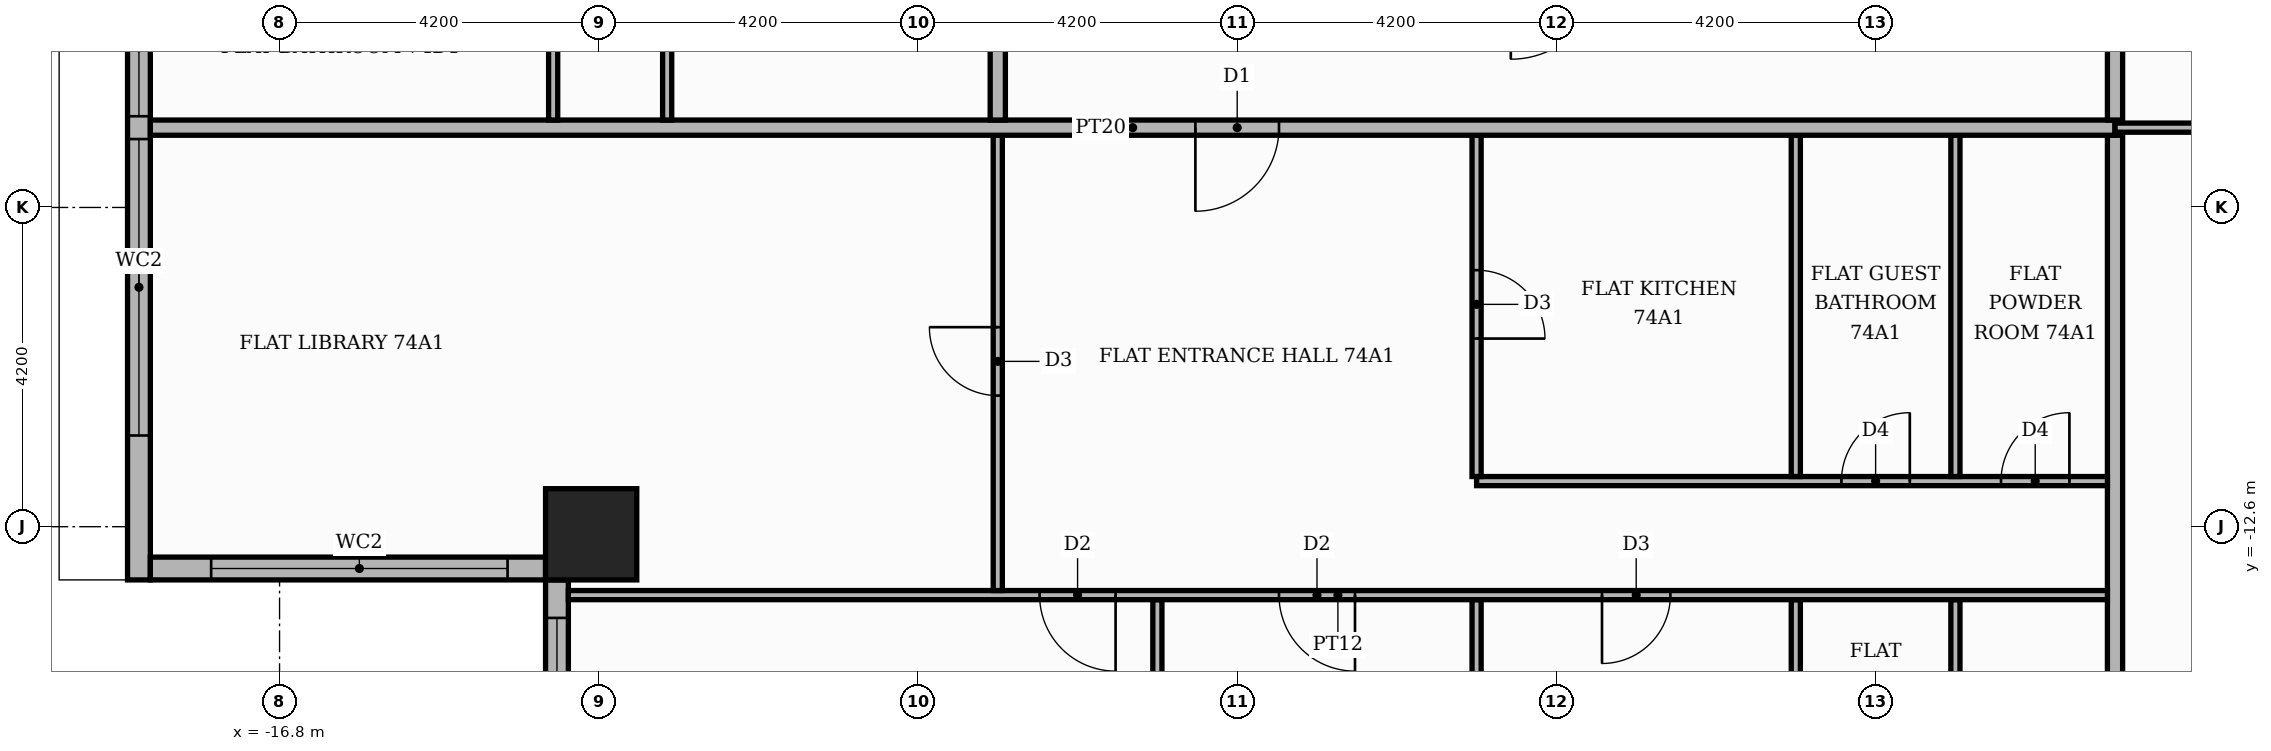
"""IFC4 building model, lengths in metres.
Left out: names, types, materials, properties, quantities, classifications, styles, units other than length and angle.
Written with IfcOpenShell. Run it as: python <this file> out.ifc"""

import sys

from ifc_helpers import new_model, si_unit, direction, frame, frame_2d, origin, origin_2d, place, context, subcontext, project, spatial, rectangle, extrude, element, fill, save


model = new_model("IFC4")
c1 = context("Model", 3, precision=1e-05, world=origin(), true_north=direction((0.0, 1.0)))
c2 = subcontext(c1, "Body", "Model", "MODEL_VIEW")
j1 = project(units=[si_unit("LENGTHUNIT", "METRE"), si_unit("PLANEANGLEUNIT", "RADIAN")], contexts=[c1])
p1 = place(None, origin())
s1 = spatial("IfcSite", under=j1, at=p1, CompositionType="ELEMENT")
p2 = place(p1, origin())
s2 = spatial("IfcBuilding", under=s1, at=p2, CompositionType="ELEMENT")
p3 = place(p2, frame((0.0, 0.0, 308.4)))
s3 = spatial("IfcBuildingStorey", under=s2, at=p3, CompositionType="ELEMENT", Elevation=308.4)
p4 = place(p3, frame((-12.7, -12.7, 0.0), z_axis=(0.0, 0.0, 1.0), x_axis=(1.0, 0.0, 0.0)))
e1 = element("IfcColumn", 1, at=p4, inside=s3, PredefinedType="COLUMN", context=c2, shape_type="SweptSolid", body=[
    extrude(rectangle(XDim=1.2, YDim=1.2, at=origin_2d()), origin(), (0.0, 0.0, 1.0), 3.9),
])
p5 = place(p3, frame((-18.65, 13.0, 0.0), z_axis=(0.0, 0.0, 1.0), x_axis=(0.0, -1.0, 0.0)))
e2 = element("IfcWall", 2, at=p5, inside=s3, PredefinedType="STANDARD", context=c2, shape_type="SweptSolid", body=[
    extrude(rectangle(XDim=26.3, YDim=0.3, at=frame_2d((13.15, 0.0))), origin(), (0.0, 0.0, 1.0), 3.55),
])
p6 = place(p5, frame((1.6, 0.0, 0.6)))
e3 = element("IfcOpeningElement", 3, at=p6, cuts=e2, PredefinedType="OPENING", context=c2, shape_type="SweptSolid", body=[
    extrude(rectangle(XDim=3.9, YDim=2.4, at=frame_2d((1.95, 1.2))), frame((0.0, 0.16, 0.0), z_axis=(0.0, -1.0, 0.0), x_axis=(1.0, 0.0, 0.0)), (0.0, 0.0, 1.0), 0.32),
])
p7 = place(p5, frame((5.8, 0.0, 0.6)))
e4 = element("IfcOpeningElement", 4, at=p7, cuts=e2, PredefinedType="OPENING", context=c2, shape_type="SweptSolid", body=[
    extrude(rectangle(XDim=3.9, YDim=2.4, at=frame_2d((1.95, 1.2))), frame((0.0, 0.16, 0.0), z_axis=(0.0, -1.0, 0.0), x_axis=(1.0, 0.0, 0.0)), (0.0, 0.0, 1.0), 0.32),
])
p8 = place(p5, frame((10.0, 0.0, 0.6)))
e5 = element("IfcOpeningElement", 5, at=p8, cuts=e2, PredefinedType="OPENING", context=c2, shape_type="SweptSolid", body=[
    extrude(rectangle(XDim=1.8, YDim=2.4, at=frame_2d((0.9, 1.2))), frame((0.0, 0.16, 0.0), z_axis=(0.0, -1.0, 0.0), x_axis=(1.0, 0.0, 0.0)), (0.0, 0.0, 1.0), 0.32),
])
p9 = place(p5, frame((12.1, 0.0, 0.6)))
e6 = element("IfcOpeningElement", 6, at=p9, cuts=e2, PredefinedType="OPENING", context=c2, shape_type="SweptSolid", body=[
    extrude(rectangle(XDim=1.8, YDim=2.4, at=frame_2d((0.9, 1.2))), frame((0.0, 0.16, 0.0), z_axis=(0.0, -1.0, 0.0), x_axis=(1.0, 0.0, 0.0)), (0.0, 0.0, 1.0), 0.32),
])
p10 = place(p5, frame((14.2, 0.0, 0.6)))
e7 = element("IfcOpeningElement", 7, at=p10, cuts=e2, PredefinedType="OPENING", context=c2, shape_type="SweptSolid", body=[
    extrude(rectangle(XDim=3.9, YDim=2.4, at=frame_2d((1.95, 1.2))), frame((0.0, 0.16, 0.0), z_axis=(0.0, -1.0, 0.0), x_axis=(1.0, 0.0, 0.0)), (0.0, 0.0, 1.0), 0.32),
])
p11 = place(p5, frame((18.4, 0.0, 0.6)))
e8 = element("IfcOpeningElement", 8, at=p11, cuts=e2, PredefinedType="OPENING", context=c2, shape_type="SweptSolid", body=[
    extrude(rectangle(XDim=1.8, YDim=2.4, at=frame_2d((0.9, 1.2))), frame((0.0, 0.16, 0.0), z_axis=(0.0, -1.0, 0.0), x_axis=(1.0, 0.0, 0.0)), (0.0, 0.0, 1.0), 0.32),
])
p12 = place(p5, frame((20.5, 0.0, 0.6)))
e9 = element("IfcOpeningElement", 9, at=p12, cuts=e2, PredefinedType="OPENING", context=c2, shape_type="SweptSolid", body=[
    extrude(rectangle(XDim=3.9, YDim=2.4, at=frame_2d((1.95, 1.2))), frame((0.0, 0.16, 0.0), z_axis=(0.0, -1.0, 0.0), x_axis=(1.0, 0.0, 0.0)), (0.0, 0.0, 1.0), 0.32),
])
p13 = place(p3, frame((-18.5, -13.15, 0.0), z_axis=(0.0, 0.0, 1.0), x_axis=(1.0, 0.0, 0.0)))
e10 = element("IfcWall", 10, at=p13, inside=s3, PredefinedType="STANDARD", context=c2, shape_type="SweptSolid", body=[
    extrude(rectangle(XDim=5.2, YDim=0.3, at=frame_2d((2.6, 0.0))), origin(), (0.0, 0.0, 1.0), 3.55),
])
p14 = place(p13, frame((0.8, 0.0, 0.6)))
e11 = element("IfcOpeningElement", 11, at=p14, cuts=e10, PredefinedType="OPENING", context=c2, shape_type="SweptSolid", body=[
    extrude(rectangle(XDim=3.9, YDim=2.4, at=frame_2d((1.95, 1.2))), frame((0.0, 0.16, 0.0), z_axis=(0.0, -1.0, 0.0), x_axis=(1.0, 0.0, 0.0)), (0.0, 0.0, 1.0), 0.32),
])
p15 = place(p3, frame((-13.15, -13.3, 0.0), z_axis=(0.0, 0.0, 1.0), x_axis=(0.0, -1.0, 0.0)))
e12 = element("IfcWall", 12, at=p15, inside=s3, PredefinedType="STANDARD", context=c2, shape_type="SweptSolid", body=[
    extrude(rectangle(XDim=5.5, YDim=0.3, at=frame_2d((2.75, 0.0))), origin(), (0.0, 0.0, 1.0), 3.55),
])
p16 = place(p15, frame((0.5, 0.0, 0.6)))
e13 = element("IfcOpeningElement", 13, at=p16, cuts=e12, PredefinedType="OPENING", context=c2, shape_type="SweptSolid", body=[
    extrude(rectangle(XDim=3.9, YDim=2.4, at=frame_2d((1.95, 1.2))), frame((0.0, 0.16, 0.0), z_axis=(0.0, -1.0, 0.0), x_axis=(1.0, 0.0, 0.0)), (0.0, 0.0, 1.0), 0.32),
])
p17 = place(p3, frame((-5.25, -18.5, 0.0), z_axis=(0.0, 0.0, 1.0), x_axis=(0.0, 1.0, 0.0)))
e14 = element("IfcWall", 14, at=p17, inside=s3, PredefinedType="PARTITIONING", context=c2, shape_type="SweptSolid", body=[
    extrude(rectangle(XDim=4.94, YDim=0.12, at=frame_2d((2.47, 0.0))), origin(), (0.0, 0.0, 1.0), 3.55),
])
p18 = place(p3, frame((3.15, -18.5, 0.0), z_axis=(0.0, 0.0, 1.0), x_axis=(0.0, 1.0, 0.0)))
e15 = element("IfcWall", 15, at=p18, inside=s3, PredefinedType="PARTITIONING", context=c2, shape_type="SweptSolid", body=[
    extrude(rectangle(XDim=4.94, YDim=0.12, at=frame_2d((2.47, 0.0))), origin(), (0.0, 0.0, 1.0), 3.55),
])
p19 = place(p18, frame((1.9, 0.0, 0.0)))
e16 = element("IfcOpeningElement", 16, at=p19, cuts=e15, PredefinedType="OPENING", context=c2, shape_type="SweptSolid", body=[
    extrude(rectangle(XDim=0.9, YDim=2.1, at=frame_2d((0.45, 1.05))), frame((0.0, 0.07, 0.0), z_axis=(0.0, -1.0, 0.0), x_axis=(1.0, 0.0, 0.0)), (0.0, 0.0, 1.0), 0.14),
])
p20 = place(p3, frame((5.25, -18.5, 0.0), z_axis=(0.0, 0.0, 1.0), x_axis=(0.0, 1.0, 0.0)))
e17 = element("IfcWall", 17, at=p20, inside=s3, PredefinedType="PARTITIONING", context=c2, shape_type="SweptSolid", body=[
    extrude(rectangle(XDim=4.94, YDim=0.12, at=frame_2d((2.47, 0.0))), origin(), (0.0, 0.0, 1.0), 3.55),
])
p21 = place(p20, frame((1.9, 0.0, 0.0)))
e18 = element("IfcOpeningElement", 18, at=p21, cuts=e17, PredefinedType="OPENING", context=c2, shape_type="SweptSolid", body=[
    extrude(rectangle(XDim=0.9, YDim=2.1, at=frame_2d((0.45, 1.05))), frame((0.0, 0.07, 0.0), z_axis=(0.0, -1.0, 0.0), x_axis=(1.0, 0.0, 0.0)), (0.0, 0.0, 1.0), 0.14),
])
p22 = place(p3, frame((7.35, -18.5, 0.0), z_axis=(0.0, 0.0, 1.0), x_axis=(0.0, 1.0, 0.0)))
e19 = element("IfcWall", 19, at=p22, inside=s3, PredefinedType="PARTITIONING", context=c2, shape_type="SweptSolid", body=[
    extrude(rectangle(XDim=11.05, YDim=0.2, at=frame_2d((5.525, 0.0))), origin(), (0.0, 0.0, 1.0), 3.55),
])
p23 = place(p3, frame((-1.05, -16.889, 0.0), z_axis=(0.0, 0.0, 1.0), x_axis=(0.0, 1.0, 0.0)))
e20 = element("IfcWall", 20, at=p23, inside=s3, PredefinedType="PARTITIONING", context=c2, shape_type="SweptSolid", body=[
    extrude(rectangle(XDim=3.329, YDim=0.12, at=frame_2d((1.665, 0.0))), origin(), (0.0, 0.0, 1.0), 3.55),
])
p24 = place(p3, frame((-13.0, -13.5, 0.0), z_axis=(0.0, 0.0, 1.0), x_axis=(1.0, 0.0, 0.0)))
e21 = element("IfcWall", 21, at=p24, inside=s3, PredefinedType="PARTITIONING", context=c2, shape_type="SweptSolid", body=[
    extrude(rectangle(XDim=20.25, YDim=0.12, at=frame_2d((10.125, 0.0))), origin(), (0.0, 0.0, 1.0), 3.55),
])
p25 = place(p24, frame((6.2, 0.0, 0.0)))
e22 = element("IfcOpeningElement", 22, at=p25, cuts=e21, PredefinedType="OPENING", context=c2, shape_type="SweptSolid", body=[
    extrude(rectangle(XDim=1.0, YDim=2.1, at=frame_2d((0.5, 1.05))), frame((0.0, 0.07, 0.0), z_axis=(0.0, -1.0, 0.0), x_axis=(1.0, 0.0, 0.0)), (0.0, 0.0, 1.0), 0.14),
])
p26 = place(p24, frame((9.35, 0.0, 0.0)))
e23 = element("IfcOpeningElement", 23, at=p26, cuts=e21, PredefinedType="OPENING", context=c2, shape_type="SweptSolid", body=[
    extrude(rectangle(XDim=1.0, YDim=2.1, at=frame_2d((0.5, 1.05))), frame((0.0, 0.07, 0.0), z_axis=(0.0, -1.0, 0.0), x_axis=(1.0, 0.0, 0.0)), (0.0, 0.0, 1.0), 0.14),
])
p27 = place(p24, frame((13.6, 0.0, 0.0)))
e24 = element("IfcOpeningElement", 24, at=p27, cuts=e21, PredefinedType="OPENING", context=c2, shape_type="SweptSolid", body=[
    extrude(rectangle(XDim=0.9, YDim=2.1, at=frame_2d((0.45, 1.05))), frame((0.0, 0.07, 0.0), z_axis=(0.0, -1.0, 0.0), x_axis=(1.0, 0.0, 0.0)), (0.0, 0.0, 1.0), 0.14),
])
p28 = place(p3, frame((-7.35, -13.44, 0.0), z_axis=(0.0, 0.0, 1.0), x_axis=(0.0, 1.0, 0.0)))
e25 = element("IfcWall", 25, at=p28, inside=s3, PredefinedType="PARTITIONING", context=c2, shape_type="SweptSolid", body=[
    extrude(rectangle(XDim=5.99, YDim=0.12, at=frame_2d((2.995, 0.0))), origin(), (0.0, 0.0, 1.0), 3.55),
])
p29 = place(p28, frame((2.565, 0.0, 0.0)))
e26 = element("IfcOpeningElement", 26, at=p29, cuts=e25, PredefinedType="OPENING", context=c2, shape_type="SweptSolid", body=[
    extrude(rectangle(XDim=0.9, YDim=2.1, at=frame_2d((0.45, 1.05))), frame((0.0, 0.07, 0.0), z_axis=(0.0, -1.0, 0.0), x_axis=(1.0, 0.0, 0.0)), (0.0, 0.0, 1.0), 0.14),
])
p30 = place(p3, frame((-1.05, -12.0, 0.0), z_axis=(0.0, 0.0, 1.0), x_axis=(1.0, 0.0, 0.0)))
e27 = element("IfcWall", 27, at=p30, inside=s3, PredefinedType="PARTITIONING", context=c2, shape_type="SweptSolid", body=[
    extrude(rectangle(XDim=8.3, YDim=0.12, at=frame_2d((4.15, 0.0))), origin(), (0.0, 0.0, 1.0), 3.55),
])
p31 = place(p30, frame((4.8, 0.0, 0.0)))
e28 = element("IfcOpeningElement", 28, at=p31, cuts=e27, PredefinedType="OPENING", context=c2, shape_type="SweptSolid", body=[
    extrude(rectangle(XDim=0.9, YDim=2.1, at=frame_2d((0.45, 1.05))), frame((0.0, 0.07, 0.0), z_axis=(0.0, -1.0, 0.0), x_axis=(1.0, 0.0, 0.0)), (0.0, 0.0, 1.0), 0.14),
])
p32 = place(p30, frame((6.9, 0.0, 0.0)))
e29 = element("IfcOpeningElement", 29, at=p32, cuts=e27, PredefinedType="OPENING", context=c2, shape_type="SweptSolid", body=[
    extrude(rectangle(XDim=0.9, YDim=2.1, at=frame_2d((0.45, 1.05))), frame((0.0, 0.07, 0.0), z_axis=(0.0, -1.0, 0.0), x_axis=(1.0, 0.0, 0.0)), (0.0, 0.0, 1.0), 0.14),
])
p33 = place(p3, frame((-1.05, -11.94, 0.0), z_axis=(0.0, 0.0, 1.0), x_axis=(0.0, 1.0, 0.0)))
e30 = element("IfcWall", 30, at=p33, inside=s3, PredefinedType="PARTITIONING", context=c2, shape_type="SweptSolid", body=[
    extrude(rectangle(XDim=4.49, YDim=0.12, at=frame_2d((2.245, 0.0))), origin(), (0.0, 0.0, 1.0), 3.55),
])
p34 = place(p33, frame((1.815, 0.0, 0.0)))
e31 = element("IfcOpeningElement", 31, at=p34, cuts=e30, PredefinedType="OPENING", context=c2, shape_type="SweptSolid", body=[
    extrude(rectangle(XDim=0.9, YDim=2.1, at=frame_2d((0.45, 1.05))), frame((0.0, 0.07, 0.0), z_axis=(0.0, -1.0, 0.0), x_axis=(1.0, 0.0, 0.0)), (0.0, 0.0, 1.0), 0.14),
])
for number, where, z_axis, x_axis in (
    (32, (3.15, -11.94, 0.0), (0.0, 0.0, 1.0), (0.0, 1.0, 0.0)),
    (33, (5.25, -11.94, 0.0), (0.0, 0.0, 1.0), (0.0, 1.0, 0.0)),
):
    element("IfcWall", number, at=place(p3, frame(where, z_axis=z_axis, x_axis=x_axis)), inside=s3, PredefinedType="PARTITIONING", context=c2, shape_type="SweptSolid", body=[
        extrude(rectangle(XDim=4.49, YDim=0.12, at=frame_2d((2.245, 0.0))), origin(), (0.0, 0.0, 1.0), 3.55),
    ])
p35 = place(p3, frame((-18.5, -7.35, 0.0), z_axis=(0.0, 0.0, 1.0), x_axis=(1.0, 0.0, 0.0)))
e34 = element("IfcWall", 34, at=p35, inside=s3, PredefinedType="PARTITIONING", context=c2, shape_type="SweptSolid", body=[
    extrude(rectangle(XDim=25.85, YDim=0.2, at=frame_2d((12.925, 0.0))), origin(), (0.0, 0.0, 1.0), 3.55),
])
p36 = place(p35, frame((13.75, 0.0, 0.0)))
e35 = element("IfcOpeningElement", 35, at=p36, cuts=e34, PredefinedType="OPENING", context=c2, shape_type="SweptSolid", body=[
    extrude(rectangle(XDim=1.1, YDim=2.4, at=frame_2d((0.55, 1.2))), frame((0.0, 0.11, 0.0), z_axis=(0.0, -1.0, 0.0), x_axis=(1.0, 0.0, 0.0)), (0.0, 0.0, 1.0), 0.22),
])
p37 = place(p3, frame((7.35, -7.35, 0.0), z_axis=(0.0, 0.0, 1.0), x_axis=(1.0, 0.0, 0.0)))
e36 = element("IfcWall", 36, at=p37, inside=s3, PredefinedType="PARTITIONING", context=c2, shape_type="SweptSolid", body=[
    extrude(rectangle(XDim=5.55, YDim=0.12, at=frame_2d((2.775, 0.0))), origin(), (0.0, 0.0, 1.0), 3.55),
])
p38 = place(p37, frame((2.325, 0.0, 0.0)))
e37 = element("IfcOpeningElement", 37, at=p38, cuts=e36, PredefinedType="OPENING", context=c2, shape_type="SweptSolid", body=[
    extrude(rectangle(XDim=0.9, YDim=2.1, at=frame_2d((0.45, 1.05))), frame((0.0, 0.07, 0.0), z_axis=(0.0, -1.0, 0.0), x_axis=(1.0, 0.0, 0.0)), (0.0, 0.0, 1.0), 0.14),
])
p39 = place(p3, frame((-13.2, -7.25, 0.0), z_axis=(0.0, 0.0, 1.0), x_axis=(0.0, 1.0, 0.0)))
e38 = element("IfcWall", 38, at=p39, inside=s3, PredefinedType="PARTITIONING", context=c2, shape_type="SweptSolid", body=[
    extrude(rectangle(XDim=1.94, YDim=0.12, at=frame_2d((0.97, 0.0))), origin(), (0.0, 0.0, 1.0), 3.55),
])
p40 = place(p3, frame((-11.7, -7.25, 0.0), z_axis=(0.0, 0.0, 1.0), x_axis=(0.0, 1.0, 0.0)))
e39 = element("IfcWall", 39, at=p40, inside=s3, PredefinedType="PARTITIONING", context=c2, shape_type="SweptSolid", body=[
    extrude(rectangle(XDim=4.64, YDim=0.12, at=frame_2d((2.32, 0.0))), origin(), (0.0, 0.0, 1.0), 3.55),
])
p41 = place(p40, frame((1.85, 0.0, 0.0)))
e40 = element("IfcOpeningElement", 40, at=p41, cuts=e39, PredefinedType="OPENING", context=c2, shape_type="SweptSolid", body=[
    extrude(rectangle(XDim=0.9, YDim=2.1, at=frame_2d((0.45, 1.05))), frame((0.0, 0.07, 0.0), z_axis=(0.0, -1.0, 0.0), x_axis=(1.0, 0.0, 0.0)), (0.0, 0.0, 1.0), 0.14),
])
p42 = place(p3, frame((-7.35, -7.25, 0.0), z_axis=(0.0, 0.0, 1.0), x_axis=(0.0, 1.0, 0.0)))
e41 = element("IfcWall", 41, at=p42, inside=s3, PredefinedType="PARTITIONING", context=c2, shape_type="SweptSolid", body=[
    extrude(rectangle(XDim=14.5, YDim=0.2, at=frame_2d((7.25, 0.0))), origin(), (0.0, 0.0, 1.0), 3.55),
])
p43 = place(p42, frame((11.95, 0.0, 0.0)))
e42 = element("IfcOpeningElement", 42, at=p43, cuts=e41, PredefinedType="OPENING", context=c2, shape_type="SweptSolid", body=[
    extrude(rectangle(XDim=1.1, YDim=2.4, at=frame_2d((0.55, 1.2))), frame((0.0, 0.11, 0.0), z_axis=(0.0, -1.0, 0.0), x_axis=(1.0, 0.0, 0.0)), (0.0, 0.0, 1.0), 0.22),
])
p44 = place(p3, frame((7.35, -7.25, 0.0), z_axis=(0.0, 0.0, 1.0), x_axis=(0.0, 1.0, 0.0)))
e43 = element("IfcWall", 43, at=p44, inside=s3, PredefinedType="PARTITIONING", context=c2, shape_type="SweptSolid", body=[
    extrude(rectangle(XDim=14.5, YDim=0.2, at=frame_2d((7.25, 0.0))), origin(), (0.0, 0.0, 1.0), 3.55),
])
p45 = place(p44, frame((2.5, 0.0, 0.0)))
e44 = element("IfcOpeningElement", 44, at=p45, cuts=e43, PredefinedType="OPENING", context=c2, shape_type="SweptSolid", body=[
    extrude(rectangle(XDim=1.1, YDim=2.4, at=frame_2d((0.55, 1.2))), frame((0.0, 0.11, 0.0), z_axis=(0.0, -1.0, 0.0), x_axis=(1.0, 0.0, 0.0)), (0.0, 0.0, 1.0), 0.22),
])
p46 = place(p11, origin())
e45 = element("IfcWindow", 45, at=p46, inside=s3, PartitioningType="SINGLE_PANEL", PredefinedType="WINDOW", context=c2, shape_type="SweptSolid", body=[
    extrude(rectangle(XDim=1.8, YDim=2.4, at=frame_2d((0.9, 1.2))), frame((0.0, 0.03, 0.0), z_axis=(0.0, -1.0, 0.0), x_axis=(1.0, 0.0, 0.0)), (0.0, 0.0, 1.0), 0.06),
])
fill(e8, e45)
p47 = place(p12, origin())
e46 = element("IfcWindow", 46, at=p47, inside=s3, PartitioningType="SINGLE_PANEL", PredefinedType="WINDOW", context=c2, shape_type="SweptSolid", body=[
    extrude(rectangle(XDim=3.9, YDim=2.4, at=frame_2d((1.95, 1.2))), frame((0.0, 0.03, 0.0), z_axis=(0.0, -1.0, 0.0), x_axis=(1.0, 0.0, 0.0)), (0.0, 0.0, 1.0), 0.06),
])
fill(e9, e46)
p48 = place(p14, origin())
e47 = element("IfcWindow", 47, at=p48, inside=s3, PartitioningType="SINGLE_PANEL", PredefinedType="WINDOW", context=c2, shape_type="SweptSolid", body=[
    extrude(rectangle(XDim=3.9, YDim=2.4, at=frame_2d((1.95, 1.2))), frame((0.0, 0.03, 0.0), z_axis=(0.0, -1.0, 0.0), x_axis=(1.0, 0.0, 0.0)), (0.0, 0.0, 1.0), 0.06),
])
fill(e11, e47)
p49 = place(p16, origin())
e48 = element("IfcWindow", 48, at=p49, inside=s3, PartitioningType="SINGLE_PANEL", PredefinedType="WINDOW", context=c2, shape_type="SweptSolid", body=[
    extrude(rectangle(XDim=3.9, YDim=2.4, at=frame_2d((1.95, 1.2))), frame((0.0, 0.03, 0.0), z_axis=(0.0, -1.0, 0.0), x_axis=(1.0, 0.0, 0.0)), (0.0, 0.0, 1.0), 0.06),
])
fill(e13, e48)
p50 = place(p36, frame((1.1, 0.0, 0.0), z_axis=(0.0, 0.0, 1.0), x_axis=(-1.0, 0.0, 0.0)))
e49 = element("IfcDoor", 49, at=p50, inside=s3, OperationType="SINGLE_SWING_LEFT", PredefinedType="DOOR", context=c2, shape_type="SweptSolid", body=[
    extrude(rectangle(XDim=1.1, YDim=2.4, at=frame_2d((0.55, 1.2))), frame((0.0, 0.025, 0.0), z_axis=(0.0, -1.0, 0.0), x_axis=(1.0, 0.0, 0.0)), (0.0, 0.0, 1.0), 0.05),
])
fill(e35, e49)
p51 = place(p29, origin())
e50 = element("IfcDoor", 50, at=p51, inside=s3, OperationType="SINGLE_SWING_RIGHT", PredefinedType="DOOR", context=c2, shape_type="SweptSolid", body=[
    extrude(rectangle(XDim=0.9, YDim=2.1, at=frame_2d((0.45, 1.05))), frame((0.0, 0.025, 0.0), z_axis=(0.0, -1.0, 0.0), x_axis=(1.0, 0.0, 0.0)), (0.0, 0.0, 1.0), 0.05),
])
fill(e26, e50)
p52 = place(p34, frame((0.9, 0.0, 0.0), z_axis=(0.0, 0.0, 1.0), x_axis=(-1.0, 0.0, 0.0)))
e51 = element("IfcDoor", 51, at=p52, inside=s3, OperationType="SINGLE_SWING_LEFT", PredefinedType="DOOR", context=c2, shape_type="SweptSolid", body=[
    extrude(rectangle(XDim=0.9, YDim=2.1, at=frame_2d((0.45, 1.05))), frame((0.0, 0.025, 0.0), z_axis=(0.0, -1.0, 0.0), x_axis=(1.0, 0.0, 0.0)), (0.0, 0.0, 1.0), 0.05),
])
fill(e31, e51)
p53 = place(p31, origin())
e52 = element("IfcDoor", 52, at=p53, inside=s3, OperationType="SINGLE_SWING_RIGHT", PredefinedType="DOOR", context=c2, shape_type="SweptSolid", body=[
    extrude(rectangle(XDim=0.9, YDim=2.1, at=frame_2d((0.45, 1.05))), frame((0.0, 0.025, 0.0), z_axis=(0.0, -1.0, 0.0), x_axis=(1.0, 0.0, 0.0)), (0.0, 0.0, 1.0), 0.05),
])
fill(e28, e52)
p54 = place(p32, origin())
e53 = element("IfcDoor", 53, at=p54, inside=s3, OperationType="SINGLE_SWING_RIGHT", PredefinedType="DOOR", context=c2, shape_type="SweptSolid", body=[
    extrude(rectangle(XDim=0.9, YDim=2.1, at=frame_2d((0.45, 1.05))), frame((0.0, 0.025, 0.0), z_axis=(0.0, -1.0, 0.0), x_axis=(1.0, 0.0, 0.0)), (0.0, 0.0, 1.0), 0.05),
])
fill(e29, e53)
p55 = place(p25, frame((1.0, 0.0, 0.0), z_axis=(0.0, 0.0, 1.0), x_axis=(-1.0, 0.0, 0.0)))
e54 = element("IfcDoor", 54, at=p55, inside=s3, OperationType="SINGLE_SWING_RIGHT", PredefinedType="DOOR", context=c2, shape_type="SweptSolid", body=[
    extrude(rectangle(XDim=1.0, YDim=2.1, at=frame_2d((0.5, 1.05))), frame((0.0, 0.025, 0.0), z_axis=(0.0, -1.0, 0.0), x_axis=(1.0, 0.0, 0.0)), (0.0, 0.0, 1.0), 0.05),
])
fill(e22, e54)
p56 = place(p26, frame((1.0, 0.0, 0.0), z_axis=(0.0, 0.0, 1.0), x_axis=(-1.0, 0.0, 0.0)))
e55 = element("IfcDoor", 55, at=p56, inside=s3, OperationType="SINGLE_SWING_RIGHT", PredefinedType="DOOR", context=c2, shape_type="SweptSolid", body=[
    extrude(rectangle(XDim=1.0, YDim=2.1, at=frame_2d((0.5, 1.05))), frame((0.0, 0.025, 0.0), z_axis=(0.0, -1.0, 0.0), x_axis=(1.0, 0.0, 0.0)), (0.0, 0.0, 1.0), 0.05),
])
fill(e23, e55)
p57 = place(p27, frame((0.9, 0.0, 0.0), z_axis=(0.0, 0.0, 1.0), x_axis=(-1.0, 0.0, 0.0)))
e56 = element("IfcDoor", 56, at=p57, inside=s3, OperationType="SINGLE_SWING_LEFT", PredefinedType="DOOR", context=c2, shape_type="SweptSolid", body=[
    extrude(rectangle(XDim=0.9, YDim=2.1, at=frame_2d((0.45, 1.05))), frame((0.0, 0.025, 0.0), z_axis=(0.0, -1.0, 0.0), x_axis=(1.0, 0.0, 0.0)), (0.0, 0.0, 1.0), 0.05),
])
fill(e24, e56)
save(model, sys.argv[1])
